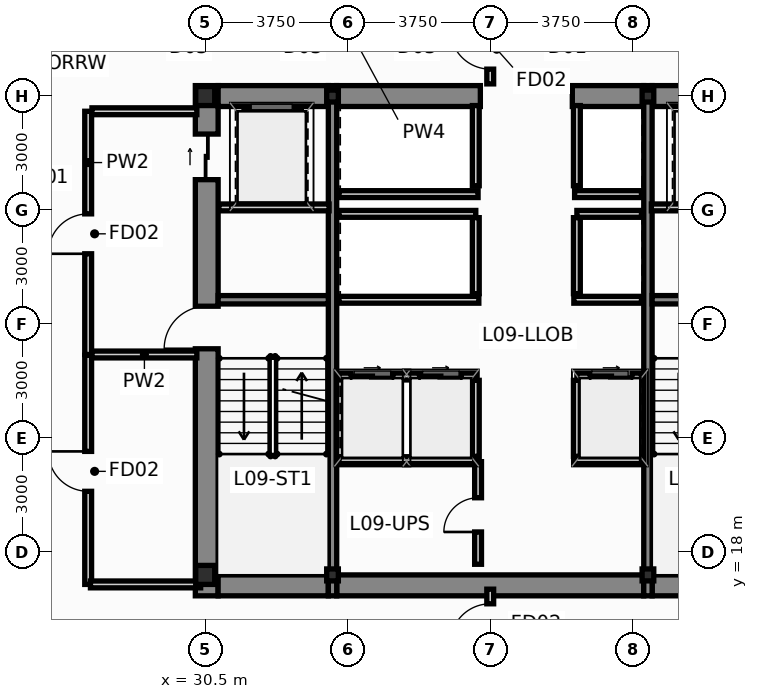
"""IFC4 building model, lengths in metres.
Left out: names, types, materials, properties, quantities, classifications, styles, units other than length and angle.
Written with IfcOpenShell. Run it as: python <this file> out.ifc"""

import sys

from ifc_helpers import new_model, si_unit, direction, frame, frame_2d, origin, origin_2d, place, context, subcontext, project, spatial, rectangle, i_section, extrude, source, transform, mapped, element, fill, save


model = new_model("IFC4")
c1 = context("Model", 3, precision=1e-05, world=origin(), true_north=direction((0.0, 1.0)))
c2 = subcontext(c1, "Body", "Model", "MODEL_VIEW")
j1 = project(units=[si_unit("LENGTHUNIT", "METRE"), si_unit("PLANEANGLEUNIT", "RADIAN")], contexts=[c1])
p1 = place(None, origin())
s1 = spatial("IfcSite", under=j1, at=p1, CompositionType="ELEMENT")
p2 = place(p1, origin())
s2 = spatial("IfcBuilding", under=s1, at=p2, CompositionType="ELEMENT")
p3 = place(p2, frame((0.0, 0.0, 38.55)))
s3 = spatial("IfcBuildingStorey", under=s2, at=p3, CompositionType="ELEMENT", Elevation=38.55)
m1 = source(origin(), c2, "Body", "SweptSolid", [
    extrude(i_section(OverallWidth=0.5, OverallDepth=0.5, WebThickness=0.028, FlangeThickness=0.04, at=origin_2d()), origin(), (0.0, 0.0, 1.0), 3.65),
])
for number, where, z_axis, x_axis in (
    (1, (30.5, 17.4, 0.0), (0.0, 0.0, 1.0), (1.0, 0.0, 0.0)),
    (2, (30.5, 30.0, 0.0), (0.0, 0.0, 1.0), (1.0, 0.0, 0.0)),
):
    element("IfcColumn", number, at=place(p3, frame(where, z_axis=z_axis, x_axis=x_axis)), inside=s3, PredefinedType="COLUMN", context=c2, shape_type="MappedRepresentation", body=[
        mapped(m1, transform((0.0, 0.0, 0.0), scale=1.0)),
    ])
m2 = source(origin(), c2, "Body", "SweptSolid", [
    extrude(i_section(OverallWidth=0.307, OverallDepth=0.315, WebThickness=0.012, FlangeThickness=0.019, at=origin_2d()), origin(), (0.0, 0.0, 1.0), 3.65),
])
for number, where, z_axis, x_axis in (
    (3, (33.85, 17.4, 0.0), (0.0, 0.0, 1.0), (1.0, 0.0, 0.0)),
    (4, (42.15, 17.4, 0.0), (0.0, 0.0, 1.0), (1.0, 0.0, 0.0)),
    (5, (33.85, 30.0, 0.0), (0.0, 0.0, 1.0), (1.0, 0.0, 0.0)),
    (6, (42.15, 30.0, 0.0), (0.0, 0.0, 1.0), (1.0, 0.0, 0.0)),
):
    element("IfcColumn", number, at=place(p3, frame(where, z_axis=z_axis, x_axis=x_axis)), inside=s3, PredefinedType="COLUMN", context=c2, shape_type="MappedRepresentation", body=[
        mapped(m2, transform((0.0, 0.0, 0.0), scale=1.0)),
    ])
p4 = place(p3, frame((30.54, 16.85, 0.0), z_axis=(0.0, 0.0, 1.0), x_axis=(0.0, 1.0, 0.0)))
e7 = element("IfcWall", 7, at=p4, inside=s3, PredefinedType="SHEAR", context=c2, shape_type="SweptSolid", body=[
    extrude(rectangle(XDim=13.425, YDim=0.6, at=frame_2d((6.712, 0.0))), origin(), (0.0, 0.0, 1.0), 3.65),
])
p5 = place(p4, frame((6.5, 0.0, 0.0)))
e8 = element("IfcOpeningElement", 8, at=p5, cuts=e7, PredefinedType="OPENING", context=c2, shape_type="SweptSolid", body=[
    extrude(rectangle(XDim=1.12, YDim=2.15, at=frame_2d((0.56, 1.075))), frame((0.0, 0.312, 0.0), z_axis=(0.0, -1.0, 0.0), x_axis=(1.0, 0.0, 0.0)), (0.0, 0.0, 1.0), 0.624),
])
p6 = place(p4, frame((10.95, 0.0, 0.0)))
e9 = element("IfcOpeningElement", 9, at=p6, cuts=e7, PredefinedType="OPENING", context=c2, shape_type="SweptSolid", body=[
    extrude(rectangle(XDim=1.2, YDim=2.2, at=frame_2d((0.6, 1.1))), frame((0.0, 0.312, 0.0), z_axis=(0.0, -1.0, 0.0), x_axis=(1.0, 0.0, 0.0)), (0.0, 0.0, 1.0), 0.624),
])
p7 = place(p3, frame((30.84, 17.125, 0.0), z_axis=(0.0, 0.0, 1.0), x_axis=(1.0, 0.0, 0.0)))
e10 = element("IfcWall", 10, at=p7, inside=s3, PredefinedType="SHEAR", context=c2, shape_type="SweptSolid", body=[
    extrude(rectangle(XDim=2.9, YDim=0.55, at=frame_2d((1.45, 0.0))), origin(), (0.0, 0.0, 1.0), 3.65),
])
p8 = place(p3, frame((33.96, 17.125, 0.0), z_axis=(0.0, 0.0, 1.0), x_axis=(1.0, 0.0, 0.0)))
e11 = element("IfcWall", 11, at=p8, inside=s3, PredefinedType="SHEAR", context=c2, shape_type="SweptSolid", body=[
    extrude(rectangle(XDim=8.08, YDim=0.55, at=frame_2d((4.04, 0.0))), origin(), (0.0, 0.0, 1.0), 3.65),
])
for number, where, z_axis, x_axis in (
    (12, (42.26, 17.125, 0.0), (0.0, 0.0, 1.0), (1.0, 0.0, 0.0)),
    (13, (30.84, 30.0, 0.0), (0.0, 0.0, 1.0), (1.0, 0.0, 0.0)),
):
    element("IfcWall", number, at=place(p3, frame(where, z_axis=z_axis, x_axis=x_axis)), inside=s3, PredefinedType="SHEAR", context=c2, shape_type="SweptSolid", body=[
        extrude(rectangle(XDim=2.9, YDim=0.55, at=frame_2d((1.45, 0.0))), origin(), (0.0, 0.0, 1.0), 3.65),
    ])
p9 = place(p3, frame((33.96, 30.0, 0.0), z_axis=(0.0, 0.0, 1.0), x_axis=(1.0, 0.0, 0.0)))
e14 = element("IfcWall", 14, at=p9, inside=s3, PredefinedType="SHEAR", context=c2, shape_type="SweptSolid", body=[
    extrude(rectangle(XDim=3.78, YDim=0.55, at=frame_2d((1.89, 0.0))), origin(), (0.0, 0.0, 1.0), 3.65),
])
p10 = place(p3, frame((40.16, 30.0, 0.0), z_axis=(0.0, 0.0, 1.0), x_axis=(1.0, 0.0, 0.0)))
e15 = element("IfcWall", 15, at=p10, inside=s3, PredefinedType="SHEAR", context=c2, shape_type="SweptSolid", body=[
    extrude(rectangle(XDim=1.88, YDim=0.55, at=frame_2d((0.94, 0.0))), origin(), (0.0, 0.0, 1.0), 3.65),
])
p11 = place(p3, frame((42.26, 30.0, 0.0), z_axis=(0.0, 0.0, 1.0), x_axis=(1.0, 0.0, 0.0)))
e16 = element("IfcWall", 16, at=p11, inside=s3, PredefinedType="SHEAR", context=c2, shape_type="SweptSolid", body=[
    extrude(rectangle(XDim=2.9, YDim=0.55, at=frame_2d((1.45, 0.0))), origin(), (0.0, 0.0, 1.0), 3.65),
])
for number, where, z_axis, x_axis in (
    (17, (33.85, 16.85, 0.0), (0.0, 0.0, 1.0), (0.0, 1.0, 0.0)),
    (18, (42.15, 16.85, 0.0), (0.0, 0.0, 1.0), (0.0, 1.0, 0.0)),
):
    element("IfcWall", number, at=place(p3, frame(where, z_axis=z_axis, x_axis=x_axis)), inside=s3, PredefinedType="SHEAR", context=c2, shape_type="SweptSolid", body=[
        extrude(rectangle(XDim=13.425, YDim=0.22, at=frame_2d((6.712, 0.0))), origin(), (0.0, 0.0, 1.0), 3.65),
    ])
for number, where, z_axis, x_axis in (
    (19, (30.84, 24.64, 0.0), (0.0, 0.0, 1.0), (1.0, 0.0, 0.0)),
    (20, (42.26, 24.64, 0.0), (0.0, 0.0, 1.0), (1.0, 0.0, 0.0)),
):
    element("IfcWall", number, at=place(p3, frame(where, z_axis=z_axis, x_axis=x_axis)), inside=s3, PredefinedType="SHEAR", context=c2, shape_type="SweptSolid", body=[
        extrude(rectangle(XDim=2.9, YDim=0.22, at=frame_2d((1.45, 0.0))), origin(), (0.0, 0.0, 1.0), 3.65),
    ])
p12 = place(p3, frame((34.02, 22.62, 0.0), z_axis=(0.0, 0.0, 1.0), x_axis=(1.0, 0.0, 0.0)))
e21 = element("IfcWall", 21, at=p12, inside=s3, PredefinedType="PARTITIONING", context=c2, shape_type="SweptSolid", body=[
    extrude(rectangle(XDim=3.6, YDim=0.18, at=frame_2d((1.8, 0.0))), origin(), (0.0, 0.0, 1.0), 3.4),
])
p13 = place(p12, frame((0.32, 0.0, 0.0)))
e22 = element("IfcOpeningElement", 22, at=p13, cuts=e21, PredefinedType="OPENING", context=c2, shape_type="SweptSolid", body=[
    extrude(rectangle(XDim=1.1, YDim=2.2, at=frame_2d((0.55, 1.1))), frame((0.0, 0.102, 0.0), z_axis=(0.0, -1.0, 0.0), x_axis=(1.0, 0.0, 0.0)), (0.0, 0.0, 1.0), 0.204),
])
p14 = place(p12, frame((2.12, 0.0, 0.0)))
e23 = element("IfcOpeningElement", 23, at=p14, cuts=e21, PredefinedType="OPENING", context=c2, shape_type="SweptSolid", body=[
    extrude(rectangle(XDim=1.1, YDim=2.2, at=frame_2d((0.55, 1.1))), frame((0.0, 0.102, 0.0), z_axis=(0.0, -1.0, 0.0), x_axis=(1.0, 0.0, 0.0)), (0.0, 0.0, 1.0), 0.204),
])
p15 = place(p3, frame((40.28, 22.62, 0.0), z_axis=(0.0, 0.0, 1.0), x_axis=(1.0, 0.0, 0.0)))
e24 = element("IfcWall", 24, at=p15, inside=s3, PredefinedType="PARTITIONING", context=c2, shape_type="SweptSolid", body=[
    extrude(rectangle(XDim=1.7, YDim=0.18, at=frame_2d((0.85, 0.0))), origin(), (0.0, 0.0, 1.0), 3.4),
])
p16 = place(p15, frame((0.35, 0.0, 0.0)))
e25 = element("IfcOpeningElement", 25, at=p16, cuts=e24, PredefinedType="OPENING", context=c2, shape_type="SweptSolid", body=[
    extrude(rectangle(XDim=1.1, YDim=2.2, at=frame_2d((0.55, 1.1))), frame((0.0, 0.102, 0.0), z_axis=(0.0, -1.0, 0.0), x_axis=(1.0, 0.0, 0.0)), (0.0, 0.0, 1.0), 0.204),
])
for number, where, z_axis, x_axis in (
    (26, (37.62, 20.52, 0.0), (0.0, 0.0, 1.0), (0.0, 1.0, 0.0)),
    (27, (40.28, 20.52, 0.0), (0.0, 0.0, 1.0), (0.0, 1.0, 0.0)),
):
    element("IfcWall", number, at=place(p3, frame(where, z_axis=z_axis, x_axis=x_axis)), inside=s3, PredefinedType="PARTITIONING", context=c2, shape_type="SweptSolid", body=[
        extrude(rectangle(XDim=2.0, YDim=0.18, at=frame_2d((1.0, 0.0))), origin(), (0.0, 0.0, 1.0), 3.4),
    ])
p17 = place(p3, frame((34.02, 26.9, 0.0), z_axis=(0.0, 0.0, 1.0), x_axis=(1.0, 0.0, 0.0)))
e28 = element("IfcWall", 28, at=p17, inside=s3, PredefinedType="PARTITIONING", context=c2, shape_type="SweptSolid", body=[
    extrude(rectangle(XDim=3.6, YDim=0.18, at=frame_2d((1.8, 0.0))), origin(), (0.0, 0.0, 1.0), 3.4),
])
p18 = place(p3, frame((40.28, 26.9, 0.0), z_axis=(0.0, 0.0, 1.0), x_axis=(1.0, 0.0, 0.0)))
e29 = element("IfcWall", 29, at=p18, inside=s3, PredefinedType="PARTITIONING", context=c2, shape_type="SweptSolid", body=[
    extrude(rectangle(XDim=1.7, YDim=0.18, at=frame_2d((0.85, 0.0))), origin(), (0.0, 0.0, 1.0), 3.4),
])
for number, where, z_axis, x_axis in (
    (30, (37.62, 24.8, 0.0), (0.0, 0.0, 1.0), (0.0, 1.0, 0.0)),
    (31, (40.28, 24.8, 0.0), (0.0, 0.0, 1.0), (0.0, 1.0, 0.0)),
):
    element("IfcWall", number, at=place(p3, frame(where, z_axis=z_axis, x_axis=x_axis)), inside=s3, PredefinedType="PARTITIONING", context=c2, shape_type="SweptSolid", body=[
        extrude(rectangle(XDim=2.0, YDim=0.18, at=frame_2d((1.0, 0.0))), origin(), (0.0, 0.0, 1.0), 3.4),
    ])
p19 = place(p3, frame((34.02, 24.64, 0.0), z_axis=(0.0, 0.0, 1.0), x_axis=(1.0, 0.0, 0.0)))
e32 = element("IfcWall", 32, at=p19, inside=s3, PredefinedType="PARTITIONING", context=c2, shape_type="SweptSolid", body=[
    extrude(rectangle(XDim=3.68, YDim=0.18, at=frame_2d((1.84, 0.0))), origin(), (0.0, 0.0, 1.0), 3.4),
])
p20 = place(p3, frame((40.2, 24.64, 0.0), z_axis=(0.0, 0.0, 1.0), x_axis=(1.0, 0.0, 0.0)))
e33 = element("IfcWall", 33, at=p20, inside=s3, PredefinedType="PARTITIONING", context=c2, shape_type="SweptSolid", body=[
    extrude(rectangle(XDim=1.78, YDim=0.18, at=frame_2d((0.89, 0.0))), origin(), (0.0, 0.0, 1.0), 3.4),
])
p21 = place(p3, frame((34.02, 27.42, 0.0), z_axis=(0.0, 0.0, 1.0), x_axis=(1.0, 0.0, 0.0)))
e34 = element("IfcWall", 34, at=p21, inside=s3, PredefinedType="PARTITIONING", context=c2, shape_type="SweptSolid", body=[
    extrude(rectangle(XDim=3.66, YDim=0.18, at=frame_2d((1.83, 0.0))), origin(), (0.0, 0.0, 1.0), 3.4),
])
p22 = place(p3, frame((40.22, 27.42, 0.0), z_axis=(0.0, 0.0, 1.0), x_axis=(1.0, 0.0, 0.0)))
e35 = element("IfcWall", 35, at=p22, inside=s3, PredefinedType="PARTITIONING", context=c2, shape_type="SweptSolid", body=[
    extrude(rectangle(XDim=1.76, YDim=0.18, at=frame_2d((0.88, 0.0))), origin(), (0.0, 0.0, 1.0), 3.4),
])
for number, where, z_axis, x_axis in (
    (36, (37.62, 27.64, 0.0), (0.0, 0.0, 1.0), (0.0, 1.0, 0.0)),
    (37, (40.28, 27.64, 0.0), (0.0, 0.0, 1.0), (0.0, 1.0, 0.0)),
):
    element("IfcWall", number, at=place(p3, frame(where, z_axis=z_axis, x_axis=x_axis)), inside=s3, PredefinedType="PARTITIONING", context=c2, shape_type="SweptSolid", body=[
        extrude(rectangle(XDim=2.11, YDim=0.18, at=frame_2d((1.055, 0.0))), origin(), (0.0, 0.0, 1.0), 3.4),
    ])
p23 = place(p3, frame((27.42, 23.2, 0.0), z_axis=(0.0, 0.0, 1.0), x_axis=(0.0, 1.0, 0.0)))
e38 = element("IfcWall", 38, at=p23, inside=s3, PredefinedType="PARTITIONING", context=c2, shape_type="SweptSolid", body=[
    extrude(rectangle(XDim=6.4, YDim=0.18, at=frame_2d((3.2, 0.0))), origin(), (0.0, 0.0, 1.0), 3.4),
])
p24 = place(p23, frame((2.65, 0.0, 0.0)))
e39 = element("IfcOpeningElement", 39, at=p24, cuts=e38, PredefinedType="OPENING", context=c2, shape_type="SweptSolid", body=[
    extrude(rectangle(XDim=1.05, YDim=2.15, at=frame_2d((0.525, 1.075))), frame((0.0, 0.102, 0.0), z_axis=(0.0, -1.0, 0.0), x_axis=(1.0, 0.0, 0.0)), (0.0, 0.0, 1.0), 0.204),
])
p25 = place(p3, frame((27.52, 23.2, 0.0), z_axis=(0.0, 0.0, 1.0), x_axis=(1.0, 0.0, 0.0)))
e40 = element("IfcWall", 40, at=p25, inside=s3, PredefinedType="PARTITIONING", context=c2, shape_type="SweptSolid", body=[
    extrude(rectangle(XDim=2.76, YDim=0.18, at=frame_2d((1.38, 0.0))), origin(), (0.0, 0.0, 1.0), 3.4),
])
p26 = place(p3, frame((27.52, 29.6, 0.0), z_axis=(0.0, 0.0, 1.0), x_axis=(1.0, 0.0, 0.0)))
e41 = element("IfcWall", 41, at=p26, inside=s3, PredefinedType="PARTITIONING", context=c2, shape_type="SweptSolid", body=[
    extrude(rectangle(XDim=2.76, YDim=0.18, at=frame_2d((1.38, 0.0))), origin(), (0.0, 0.0, 1.0), 2.783),
])
for number, where, z_axis, x_axis in (
    (42, (30.86, 27.07, 0.0), (0.0, 0.0, 1.0), (1.0, 0.0, 0.0)),
    (43, (42.24, 27.07, 0.0), (0.0, 0.0, 1.0), (1.0, 0.0, 0.0)),
):
    element("IfcWall", number, at=place(p3, frame(where, z_axis=z_axis, x_axis=x_axis)), inside=s3, PredefinedType="PARTITIONING", context=c2, shape_type="SweptSolid", body=[
        extrude(rectangle(XDim=2.9, YDim=0.18, at=frame_2d((1.45, 0.0))), origin(), (0.0, 0.0, 1.0), 3.4),
    ])
p27 = place(p3, frame((34.02, 20.42, 0.0), z_axis=(0.0, 0.0, 1.0), x_axis=(1.0, 0.0, 0.0)))
e44 = element("IfcWall", 44, at=p27, inside=s3, PredefinedType="PARTITIONING", context=c2, shape_type="SweptSolid", body=[
    extrude(rectangle(XDim=3.64, YDim=0.18, at=frame_2d((1.82, 0.0))), origin(), (0.0, 0.0, 1.0), 3.4),
])
p28 = place(p3, frame((40.22, 20.42, 0.0), z_axis=(0.0, 0.0, 1.0), x_axis=(1.0, 0.0, 0.0)))
e45 = element("IfcWall", 45, at=p28, inside=s3, PredefinedType="PARTITIONING", context=c2, shape_type="SweptSolid", body=[
    extrude(rectangle(XDim=1.76, YDim=0.18, at=frame_2d((0.88, 0.0))), origin(), (0.0, 0.0, 1.0), 3.4),
])
p29 = place(p3, frame((37.68, 17.68, 0.0), z_axis=(0.0, 0.0, 1.0), x_axis=(0.0, 1.0, 0.0)))
e46 = element("IfcWall", 46, at=p29, inside=s3, PredefinedType="PARTITIONING", context=c2, shape_type="SweptSolid", body=[
    extrude(rectangle(XDim=2.7, YDim=0.18, at=frame_2d((1.35, 0.0))), origin(), (0.0, 0.0, 1.0), 3.4),
])
p30 = place(p29, frame((0.85, 0.0, 0.0)))
e47 = element("IfcOpeningElement", 47, at=p30, cuts=e46, PredefinedType="OPENING", context=c2, shape_type="SweptSolid", body=[
    extrude(rectangle(XDim=0.9, YDim=2.1, at=frame_2d((0.45, 1.05))), frame((0.0, 0.102, 0.0), z_axis=(0.0, -1.0, 0.0), x_axis=(1.0, 0.0, 0.0)), (0.0, 0.0, 1.0), 0.204),
])
p31 = place(p3, frame((27.42, 17.15, 0.0), z_axis=(0.0, 0.0, 1.0), x_axis=(0.0, 1.0, 0.0)))
e48 = element("IfcWall", 48, at=p31, inside=s3, PredefinedType="PARTITIONING", context=c2, shape_type="SweptSolid", body=[
    extrude(rectangle(XDim=6.03, YDim=0.18, at=frame_2d((3.015, 0.0))), origin(), (0.0, 0.0, 1.0), 3.026),
])
p32 = place(p31, frame((2.45, 0.0, 0.0)))
e49 = element("IfcOpeningElement", 49, at=p32, cuts=e48, PredefinedType="OPENING", context=c2, shape_type="SweptSolid", body=[
    extrude(rectangle(XDim=1.05, YDim=2.15, at=frame_2d((0.525, 1.075))), frame((0.0, 0.102, 0.0), z_axis=(0.0, -1.0, 0.0), x_axis=(1.0, 0.0, 0.0)), (0.0, 0.0, 1.0), 0.204),
])
p33 = place(p3, frame((27.48, 17.15, 0.0), z_axis=(0.0, 0.0, 1.0), x_axis=(1.0, 0.0, 0.0)))
e50 = element("IfcWall", 50, at=p33, inside=s3, PredefinedType="PARTITIONING", context=c2, shape_type="SweptSolid", body=[
    extrude(rectangle(XDim=2.9, YDim=0.18, at=frame_2d((1.45, 0.0))), origin(), (0.0, 0.0, 1.0), 2.783),
])
p34 = place(p3, frame((38.0, 15.205, 0.0), z_axis=(0.0, 0.0, 1.0), x_axis=(0.0, 1.0, 0.0)))
e51 = element("IfcWall", 51, at=p34, inside=s3, PredefinedType="PARTITIONING", context=c2, shape_type="SweptSolid", body=[
    extrude(rectangle(XDim=1.82, YDim=0.18, at=frame_2d((0.91, 0.0))), origin(), (0.0, 0.0, 1.0), 3.4),
])
p35 = place(p34, frame((0.385, 0.0, 0.0)))
e52 = element("IfcOpeningElement", 52, at=p35, cuts=e51, PredefinedType="OPENING", context=c2, shape_type="SweptSolid", body=[
    extrude(rectangle(XDim=1.05, YDim=2.15, at=frame_2d((0.525, 1.075))), frame((0.0, 0.102, 0.0), z_axis=(0.0, -1.0, 0.0), x_axis=(1.0, 0.0, 0.0)), (0.0, 0.0, 1.0), 0.204),
])
p36 = place(p3, frame((38.0, 30.32, 0.0), z_axis=(0.0, 0.0, 1.0), x_axis=(0.0, 1.0, 0.0)))
e53 = element("IfcWall", 53, at=p36, inside=s3, PredefinedType="PARTITIONING", context=c2, shape_type="SweptSolid", body=[
    extrude(rectangle(XDim=1.825, YDim=0.18, at=frame_2d((0.913, 0.0))), origin(), (0.0, 0.0, 1.0), 3.4),
])
p37 = place(p36, frame((0.388, 0.0, 0.0)))
e54 = element("IfcOpeningElement", 54, at=p37, cuts=e53, PredefinedType="OPENING", context=c2, shape_type="SweptSolid", body=[
    extrude(rectangle(XDim=1.05, YDim=2.15, at=frame_2d((0.525, 1.075))), frame((0.0, 0.102, 0.0), z_axis=(0.0, -1.0, 0.0), x_axis=(1.0, 0.0, 0.0)), (0.0, 0.0, 1.0), 0.204),
])
p38 = place(p5, origin())
e55 = element("IfcDoor", 55, at=p38, inside=s3, OperationType="SINGLE_SWING_LEFT", PredefinedType="DOOR", context=c2, shape_type="SweptSolid", body=[
    extrude(rectangle(XDim=1.12, YDim=2.15, at=frame_2d((0.56, 1.075))), frame((0.0, 0.025, 0.0), z_axis=(0.0, -1.0, 0.0), x_axis=(1.0, 0.0, 0.0)), (0.0, 0.0, 1.0), 0.05),
])
fill(e8, e55)
p39 = place(p6, origin())
e56 = element("IfcDoor", 56, at=p39, inside=s3, OperationType="SLIDING_TO_LEFT", PredefinedType="DOOR", context=c2, shape_type="SweptSolid", body=[
    extrude(rectangle(XDim=1.2, YDim=2.2, at=frame_2d((0.6, 1.1))), frame((0.0, 0.025, 0.0), z_axis=(0.0, -1.0, 0.0), x_axis=(1.0, 0.0, 0.0)), (0.0, 0.0, 1.0), 0.05),
])
fill(e9, e56)
p40 = place(p13, origin())
e57 = element("IfcDoor", 57, at=p40, inside=s3, OperationType="SLIDING_TO_LEFT", PredefinedType="DOOR", context=c2, shape_type="SweptSolid", body=[
    extrude(rectangle(XDim=1.1, YDim=2.2, at=frame_2d((0.55, 1.1))), frame((0.0, 0.025, 0.0), z_axis=(0.0, -1.0, 0.0), x_axis=(1.0, 0.0, 0.0)), (0.0, 0.0, 1.0), 0.05),
])
fill(e22, e57)
p41 = place(p14, origin())
e58 = element("IfcDoor", 58, at=p41, inside=s3, OperationType="SLIDING_TO_RIGHT", PredefinedType="DOOR", context=c2, shape_type="SweptSolid", body=[
    extrude(rectangle(XDim=1.1, YDim=2.2, at=frame_2d((0.55, 1.1))), frame((0.0, 0.025, 0.0), z_axis=(0.0, -1.0, 0.0), x_axis=(1.0, 0.0, 0.0)), (0.0, 0.0, 1.0), 0.05),
])
fill(e23, e58)
p42 = place(p16, origin())
e59 = element("IfcDoor", 59, at=p42, inside=s3, OperationType="SLIDING_TO_LEFT", PredefinedType="DOOR", context=c2, shape_type="SweptSolid", body=[
    extrude(rectangle(XDim=1.1, YDim=2.2, at=frame_2d((0.55, 1.1))), frame((0.0, 0.025, 0.0), z_axis=(0.0, -1.0, 0.0), x_axis=(1.0, 0.0, 0.0)), (0.0, 0.0, 1.0), 0.05),
])
fill(e25, e59)
p43 = place(p24, origin())
e60 = element("IfcDoor", 60, at=p43, inside=s3, OperationType="SINGLE_SWING_LEFT", PredefinedType="DOOR", context=c2, shape_type="SweptSolid", body=[
    extrude(rectangle(XDim=1.05, YDim=2.15, at=frame_2d((0.525, 1.075))), frame((0.0, 0.025, 0.0), z_axis=(0.0, -1.0, 0.0), x_axis=(1.0, 0.0, 0.0)), (0.0, 0.0, 1.0), 0.05),
])
fill(e39, e60)
p44 = place(p30, origin())
e61 = element("IfcDoor", 61, at=p44, inside=s3, OperationType="SINGLE_SWING_LEFT", PredefinedType="DOOR", context=c2, shape_type="SweptSolid", body=[
    extrude(rectangle(XDim=0.9, YDim=2.1, at=frame_2d((0.45, 1.05))), frame((0.0, 0.025, 0.0), z_axis=(0.0, -1.0, 0.0), x_axis=(1.0, 0.0, 0.0)), (0.0, 0.0, 1.0), 0.05),
])
fill(e47, e61)
p45 = place(p32, origin())
e62 = element("IfcDoor", 62, at=p45, inside=s3, OperationType="SINGLE_SWING_RIGHT", PredefinedType="DOOR", context=c2, shape_type="SweptSolid", body=[
    extrude(rectangle(XDim=1.05, YDim=2.15, at=frame_2d((0.525, 1.075))), frame((0.0, 0.025, 0.0), z_axis=(0.0, -1.0, 0.0), x_axis=(1.0, 0.0, 0.0)), (0.0, 0.0, 1.0), 0.05),
])
fill(e49, e62)
p46 = place(p35, origin())
e63 = element("IfcDoor", 63, at=p46, inside=s3, OperationType="SINGLE_SWING_LEFT", PredefinedType="DOOR", context=c2, shape_type="SweptSolid", body=[
    extrude(rectangle(XDim=1.05, YDim=2.15, at=frame_2d((0.525, 1.075))), frame((0.0, 0.025, 0.0), z_axis=(0.0, -1.0, 0.0), x_axis=(1.0, 0.0, 0.0)), (0.0, 0.0, 1.0), 0.05),
])
fill(e52, e63)
p47 = place(p37, origin())
e64 = element("IfcDoor", 64, at=p47, inside=s3, OperationType="SINGLE_SWING_RIGHT", PredefinedType="DOOR", context=c2, shape_type="SweptSolid", body=[
    extrude(rectangle(XDim=1.05, YDim=2.15, at=frame_2d((0.525, 1.075))), frame((0.0, 0.025, 0.0), z_axis=(0.0, -1.0, 0.0), x_axis=(1.0, 0.0, 0.0)), (0.0, 0.0, 1.0), 0.05),
])
fill(e54, e64)
save(model, sys.argv[1])
